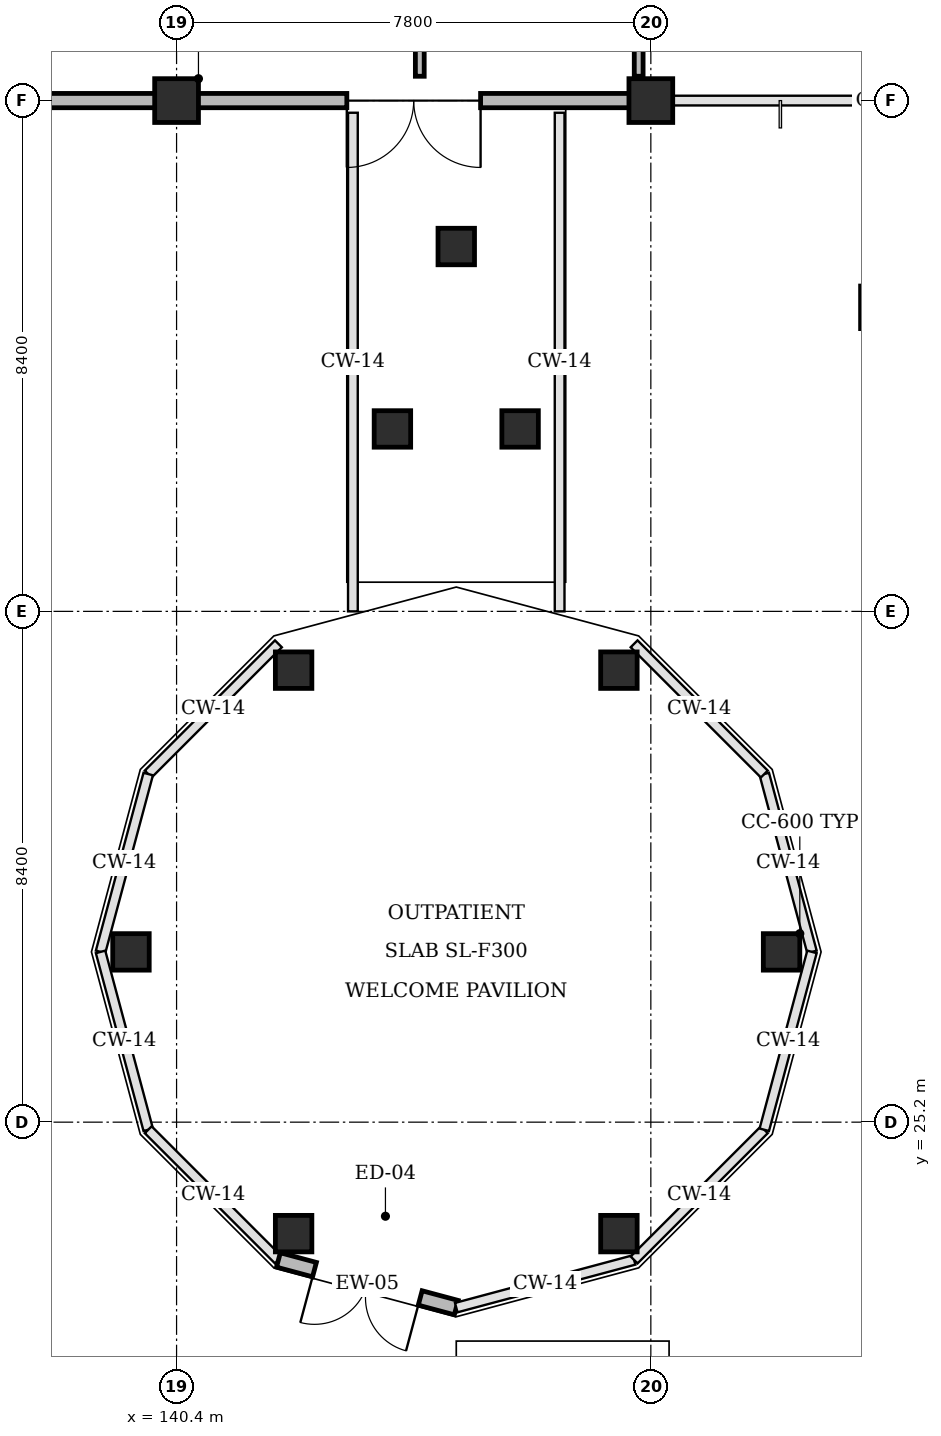
"""IFC4 building model, lengths in metres.
Left out: names, types, materials, properties, quantities, classifications, styles, units other than length and angle.
Written with IfcOpenShell. Run it as: python <this file> out.ifc"""

import sys

from ifc_helpers import new_model, si_unit, direction, frame, frame_2d, origin, origin_2d, place, context, subcontext, project, spatial, rectangle, circle, extrude, element, fill, save


model = new_model("IFC4")
c1 = context("Model", 3, precision=1e-05, world=origin(), true_north=direction((0.0, 1.0)))
c2 = subcontext(c1, "Body", "Model", "MODEL_VIEW")
j1 = project(units=[si_unit("LENGTHUNIT", "METRE"), si_unit("PLANEANGLEUNIT", "RADIAN")], contexts=[c1])
p1 = place(None, origin())
s1 = spatial("IfcSite", under=j1, at=p1, CompositionType="ELEMENT")
p2 = place(p1, origin())
s2 = spatial("IfcBuilding", under=s1, at=p2, CompositionType="ELEMENT")
p3 = place(p2, origin())
s3 = spatial("IfcBuildingStorey", under=s2, at=p3, CompositionType="ELEMENT", Elevation=0.0)
for number, where, z_axis, x_axis in (
    (1, (140.4, 42.0, 0.0), (0.0, 0.0, 1.0), (1.0, 0.0, 0.0)),
    (2, (148.2, 42.0, 0.0), (0.0, 0.0, 1.0), (1.0, 0.0, 0.0)),
):
    element("IfcColumn", number, at=place(p3, frame(where, z_axis=z_axis, x_axis=x_axis)), inside=s3, PredefinedType="COLUMN", context=c2, shape_type="SweptSolid", body=[
        extrude(rectangle(XDim=0.72, YDim=0.72, at=origin_2d()), origin(), (0.0, 0.0, 1.0), 4.8),
    ])
for number, where, z_axis, x_axis in (
    (3, (150.35, 28.0, -0.3), (0.0, 0.0, 1.0), (1.0, 0.0, 0.0)),
    (4, (147.675, 32.633, -0.3), (0.0, 0.0, 1.0), (1.0, 0.0, 0.0)),
    (5, (142.325, 32.633, -0.3), (0.0, 0.0, 1.0), (1.0, 0.0, 0.0)),
    (6, (139.65, 28.0, -0.3), (0.0, 0.0, 1.0), (1.0, 0.0, 0.0)),
    (7, (142.325, 23.367, -0.3), (0.0, 0.0, 1.0), (1.0, 0.0, 0.0)),
    (8, (147.675, 23.367, -0.3), (0.0, 0.0, 1.0), (1.0, 0.0, 0.0)),
):
    element("IfcColumn", number, at=place(p3, frame(where, z_axis=z_axis, x_axis=x_axis)), inside=s3, PredefinedType="PILASTER", context=c2, shape_type="SweptSolid", body=[
        extrude(circle(Radius=0.3, at=origin_2d()), origin(), (0.0, 0.0, 1.0), 4.84),
    ])
for number, where, z_axis, x_axis in (
    (9, (143.95, 36.6, -0.3), (0.0, 0.0, 1.0), (1.0, 0.0, 0.0)),
    (10, (146.05, 36.6, -0.3), (0.0, 0.0, 1.0), (1.0, 0.0, 0.0)),
    (11, (145.0, 39.6, -0.3), (0.0, 0.0, 1.0), (1.0, 0.0, 0.0)),
):
    element("IfcColumn", number, at=place(p3, frame(where, z_axis=z_axis, x_axis=x_axis)), inside=s3, PredefinedType="PILASTER", context=c2, shape_type="SweptSolid", body=[
        extrude(circle(Radius=0.3, at=origin_2d()), origin(), (0.0, 0.0, 1.0), 4.58),
    ])
p4 = place(p3, frame((140.06, 42.0, 0.0), z_axis=(0.0, 0.0, 1.0), x_axis=(-1.0, 0.0, 0.0)))
e12 = element("IfcWall", 12, at=p4, inside=s3, PredefinedType="STANDARD", context=c2, shape_type="SweptSolid", body=[
    extrude(rectangle(XDim=7.12, YDim=0.235, at=frame_2d((3.56, 0.0))), origin(), (0.0, 0.0, 1.0), 3.63),
])
p5 = place(p4, frame((2.46, 0.0, 0.0)))
e13 = element("IfcOpeningElement", 13, at=p5, cuts=e12, PredefinedType="OPENING", context=c2, shape_type="SweptSolid", body=[
    extrude(rectangle(XDim=2.2, YDim=2.35, at=frame_2d((1.1, 1.175))), frame((0.0, 0.127, 0.0), z_axis=(0.0, -1.0, 0.0), x_axis=(1.0, 0.0, 0.0)), (0.0, 0.0, 1.0), 0.255),
])
p6 = place(p3, frame((147.86, 42.0, 0.0), z_axis=(0.0, 0.0, 1.0), x_axis=(-1.0, 0.0, 0.0)))
e14 = element("IfcWall", 14, at=p6, inside=s3, PredefinedType="STANDARD", context=c2, shape_type="SweptSolid", body=[
    extrude(rectangle(XDim=7.12, YDim=0.235, at=frame_2d((3.56, 0.0))), origin(), (0.0, 0.0, 1.0), 3.63),
])
p7 = place(p6, frame((2.46, 0.0, 0.0)))
e15 = element("IfcOpeningElement", 15, at=p7, cuts=e14, PredefinedType="OPENING", context=c2, shape_type="SweptSolid", body=[
    extrude(rectangle(XDim=2.2, YDim=2.35, at=frame_2d((1.1, 1.175))), frame((0.0, 0.127, 0.0), z_axis=(0.0, -1.0, 0.0), x_axis=(1.0, 0.0, 0.0)), (0.0, 0.0, 1.0), 0.255),
])
p8 = place(p3, frame((145.0, 22.15, 0.0), z_axis=(0.0, 0.0, 1.0), x_axis=(-0.965911701678, 0.258871753116, 0.0)))
e16 = element("IfcWall", 16, at=p8, inside=s3, PredefinedType="STANDARD", context=c2, shape_type="SweptSolid", body=[
    extrude(rectangle(XDim=3.028, YDim=0.245, at=frame_2d((1.514, 0.0))), origin(), (0.0, 0.0, 1.0), 3.63),
])
p9 = place(p8, frame((0.614, 0.0, 0.0)))
e17 = element("IfcOpeningElement", 17, at=p9, cuts=e16, PredefinedType="OPENING", context=c2, shape_type="SweptSolid", body=[
    extrude(rectangle(XDim=1.8, YDim=2.25, at=frame_2d((0.9, 1.125))), frame((0.0, 0.133, 0.0), z_axis=(0.0, -1.0, 0.0), x_axis=(1.0, 0.0, 0.0)), (0.0, 0.0, 1.0), 0.265),
])
p10 = place(p3, frame((144.4, 42.4, 0.0), z_axis=(0.0, 0.0, 1.0), x_axis=(0.0, 1.0, 0.0)))
e18 = element("IfcWall", 18, at=p10, inside=s3, PredefinedType="PARTITIONING", context=c2, shape_type="SweptSolid", body=[
    extrude(rectangle(XDim=33.6, YDim=0.145, at=frame_2d((16.8, 0.0))), origin(), (0.0, 0.0, 1.0), 4.46),
])
p11 = place(p10, frame((16.225, 0.0, 0.0)))
e19 = element("IfcOpeningElement", 19, at=p11, cuts=e18, PredefinedType="OPENING", context=c2, shape_type="SweptSolid", body=[
    extrude(rectangle(XDim=1.15, YDim=2.15, at=frame_2d((0.575, 1.075))), frame((0.0, 0.083, 0.0), z_axis=(0.0, -1.0, 0.0), x_axis=(1.0, 0.0, 0.0)), (0.0, 0.0, 1.0), 0.165),
])
p12 = place(p3, frame((148.0, 42.4, 0.0), z_axis=(0.0, 0.0, 1.0), x_axis=(0.0, 1.0, 0.0)))
e20 = element("IfcWall", 20, at=p12, inside=s3, PredefinedType="PARTITIONING", context=c2, shape_type="SweptSolid", body=[
    extrude(rectangle(XDim=21.0, YDim=0.145, at=frame_2d((10.5, 0.0))), origin(), (0.0, 0.0, 1.0), 3.615),
])
p13 = place(p12, frame((9.95, 0.0, 0.0)))
e21 = element("IfcOpeningElement", 21, at=p13, cuts=e20, PredefinedType="OPENING", context=c2, shape_type="SweptSolid", body=[
    extrude(rectangle(XDim=1.1, YDim=2.15, at=frame_2d((0.55, 1.075))), frame((0.0, 0.083, 0.0), z_axis=(0.0, -1.0, 0.0), x_axis=(1.0, 0.0, 0.0)), (0.0, 0.0, 1.0), 0.165),
])
p14 = place(p7, origin())
e22 = element("IfcDoor", 22, at=p14, inside=s3, OperationType="DOUBLE_DOOR_SINGLE_SWING", PredefinedType="DOOR", context=c2, shape_type="SweptSolid", body=[
    extrude(rectangle(XDim=2.2, YDim=2.35, at=frame_2d((1.1, 1.175))), frame((0.0, 0.025, 0.0), z_axis=(0.0, -1.0, 0.0), x_axis=(1.0, 0.0, 0.0)), (0.0, 0.0, 1.0), 0.05),
])
fill(e15, e22)
p15 = place(p9, origin())
e23 = element("IfcDoor", 23, at=p15, inside=s3, OperationType="DOUBLE_DOOR_SINGLE_SWING", PredefinedType="DOOR", context=c2, shape_type="SweptSolid", body=[
    extrude(rectangle(XDim=1.8, YDim=2.25, at=frame_2d((0.9, 1.125))), frame((0.0, 0.025, 0.0), z_axis=(0.0, -1.0, 0.0), x_axis=(1.0, 0.0, 0.0)), (0.0, 0.0, 1.0), 0.05),
])
fill(e17, e23)
save(model, sys.argv[1])
